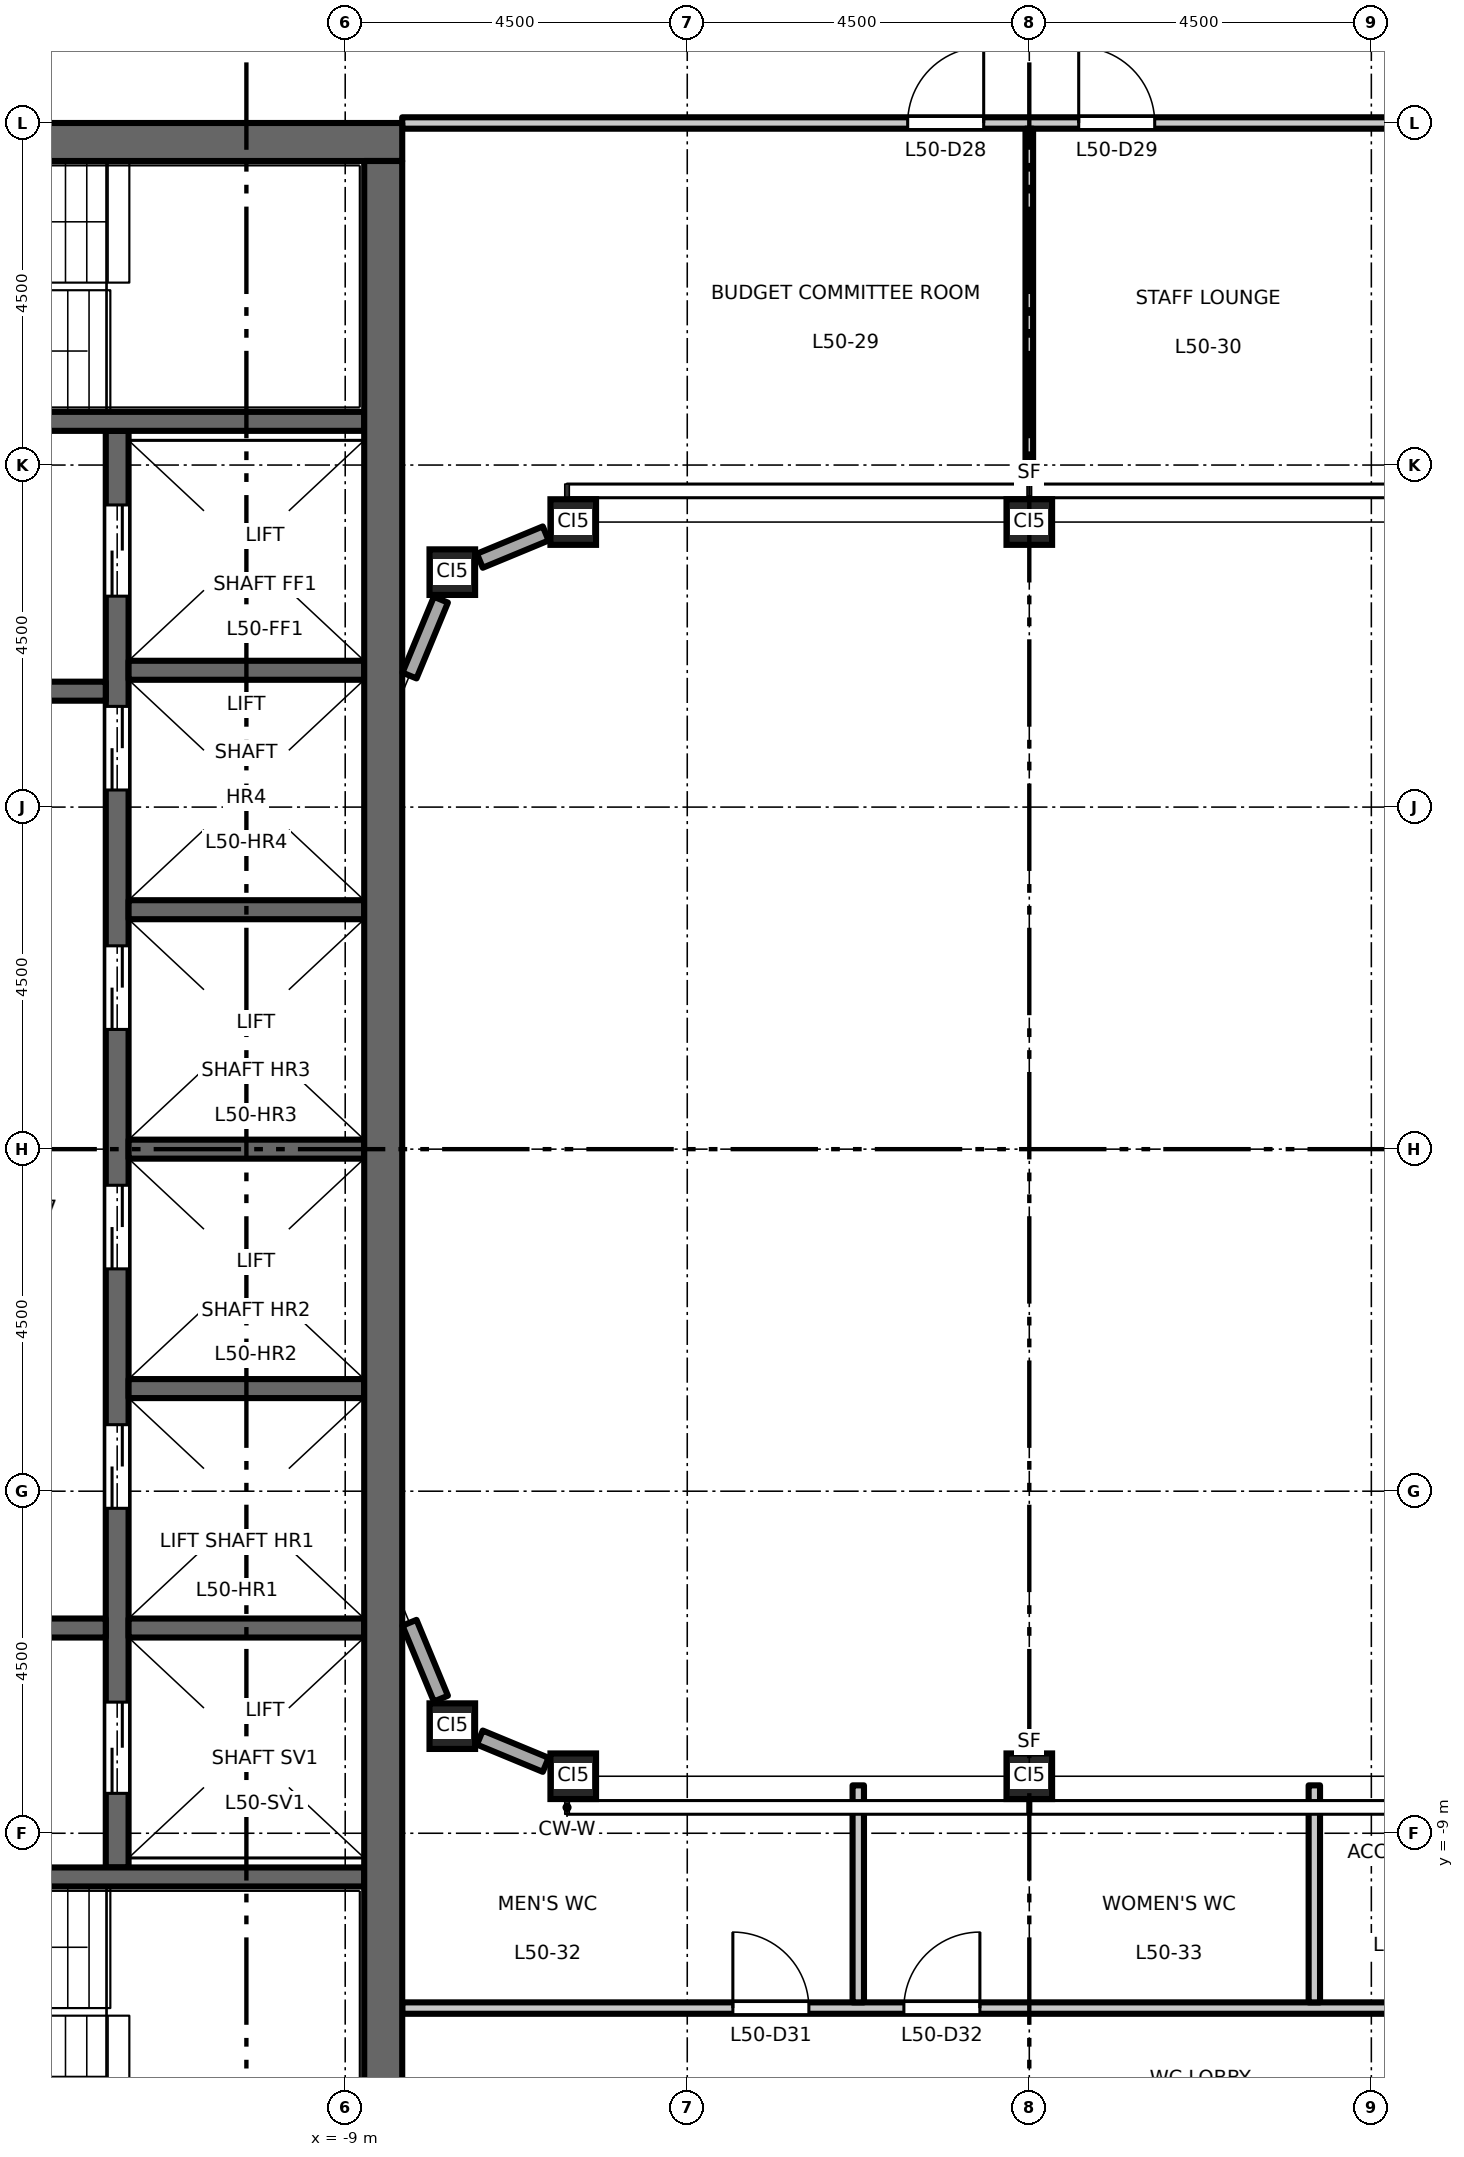
"""IFC4 building model, lengths in metres.
Left out: names, types, materials, properties, quantities, classifications, styles, units other than length and angle.
Written with IfcOpenShell. Run it as: python <this file> out.ifc"""

import sys

from ifc_helpers import new_model, si_unit, direction, frame, frame_2d, origin, origin_2d, place, context, subcontext, project, spatial, rectangle, hollow_rectangle, extrude, element, fill, save


model = new_model("IFC4")
c1 = context("Model", 3, precision=1e-05, world=origin(), true_north=direction((0.0, 1.0)))
c2 = subcontext(c1, "Body", "Model", "MODEL_VIEW")
j1 = project(units=[si_unit("LENGTHUNIT", "METRE"), si_unit("PLANEANGLEUNIT", "RADIAN")], contexts=[c1])
p1 = place(None, origin())
s1 = spatial("IfcSite", under=j1, at=p1, CompositionType="ELEMENT")
p2 = place(p1, origin())
s2 = spatial("IfcBuilding", under=s1, at=p2, CompositionType="ELEMENT")
p3 = place(p2, frame((0.0, 0.0, 233.2)))
s3 = spatial("IfcBuildingStorey", under=s2, at=p3, CompositionType="ELEMENT", Elevation=233.2)
for number, where, z_axis, x_axis in (
    (1, (-7.591, -7.591, 0.0), (0.0, 0.0, 1.0), (1.0, 0.0, 0.0)),
    (2, (-6.0, -8.25, 0.0), (0.0, 0.0, 1.0), (1.0, 0.0, 0.0)),
    (3, (0.0, -8.25, 0.0), (0.0, 0.0, 1.0), (1.0, 0.0, 0.0)),
    (4, (-7.591, 7.591, 0.0), (0.0, 0.0, 1.0), (1.0, 0.0, 0.0)),
    (5, (-6.0, 8.25, 0.0), (0.0, 0.0, 1.0), (1.0, 0.0, 0.0)),
    (6, (0.0, 8.25, 0.0), (0.0, 0.0, 1.0), (1.0, 0.0, 0.0)),
):
    element("IfcColumn", number, at=place(p3, frame(where, z_axis=z_axis, x_axis=x_axis)), inside=s3, PredefinedType="COLUMN", context=c2, shape_type="SweptSolid", body=[
        extrude(hollow_rectangle(XDim=0.6, YDim=0.6, WallThickness=0.032, at=origin_2d()), origin(), (0.0, 0.0, 1.0), 4.5),
    ])
p4 = place(p3, frame((-12.0, -9.45, 0.0), z_axis=(0.0, 0.0, 1.0), x_axis=(0.0, 1.0, 0.0)))
e7 = element("IfcWall", 7, at=p4, inside=s3, PredefinedType="SHEAR", context=c2, shape_type="SweptSolid", body=[
    extrude(rectangle(XDim=18.9, YDim=0.3, at=frame_2d((9.45, 0.0))), origin(), (0.0, 0.0, 1.0), 4.35),
])
p5 = place(p4, frame((4.725, 0.0, 0.0)))
e8 = element("IfcOpeningElement", 8, at=p5, cuts=e7, PredefinedType="OPENING", context=c2, shape_type="SweptSolid", body=[
    extrude(rectangle(XDim=1.1, YDim=2.1, at=frame_2d((0.55, 1.05))), frame((0.0, 0.16, 0.0), z_axis=(0.0, -1.0, 0.0), x_axis=(1.0, 0.0, 0.0)), (0.0, 0.0, 1.0), 0.32),
])
p6 = place(p4, frame((7.875, 0.0, 0.0)))
e9 = element("IfcOpeningElement", 9, at=p6, cuts=e7, PredefinedType="OPENING", context=c2, shape_type="SweptSolid", body=[
    extrude(rectangle(XDim=1.1, YDim=2.1, at=frame_2d((0.55, 1.05))), frame((0.0, 0.16, 0.0), z_axis=(0.0, -1.0, 0.0), x_axis=(1.0, 0.0, 0.0)), (0.0, 0.0, 1.0), 0.32),
])
p7 = place(p4, frame((11.025, 0.0, 0.0)))
e10 = element("IfcOpeningElement", 10, at=p7, cuts=e7, PredefinedType="OPENING", context=c2, shape_type="SweptSolid", body=[
    extrude(rectangle(XDim=1.1, YDim=2.1, at=frame_2d((0.55, 1.05))), frame((0.0, 0.16, 0.0), z_axis=(0.0, -1.0, 0.0), x_axis=(1.0, 0.0, 0.0)), (0.0, 0.0, 1.0), 0.32),
])
p8 = place(p4, frame((14.175, 0.0, 0.0)))
e11 = element("IfcOpeningElement", 11, at=p8, cuts=e7, PredefinedType="OPENING", context=c2, shape_type="SweptSolid", body=[
    extrude(rectangle(XDim=1.1, YDim=2.1, at=frame_2d((0.55, 1.05))), frame((0.0, 0.16, 0.0), z_axis=(0.0, -1.0, 0.0), x_axis=(1.0, 0.0, 0.0)), (0.0, 0.0, 1.0), 0.32),
])
p9 = place(p4, frame((16.725, 0.0, 0.0)))
e12 = element("IfcOpeningElement", 12, at=p9, cuts=e7, PredefinedType="OPENING", context=c2, shape_type="SweptSolid", body=[
    extrude(rectangle(XDim=1.2, YDim=2.1, at=frame_2d((0.6, 1.05))), frame((0.0, 0.16, 0.0), z_axis=(0.0, -1.0, 0.0), x_axis=(1.0, 0.0, 0.0)), (0.0, 0.0, 1.0), 0.32),
])
p10 = place(p4, frame((0.975, 0.0, 0.0)))
e13 = element("IfcOpeningElement", 13, at=p10, cuts=e7, PredefinedType="OPENING", context=c2, shape_type="SweptSolid", body=[
    extrude(rectangle(XDim=1.2, YDim=2.1, at=frame_2d((0.6, 1.05))), frame((0.0, 0.16, 0.0), z_axis=(0.0, -1.0, 0.0), x_axis=(1.0, 0.0, 0.0)), (0.0, 0.0, 1.0), 0.32),
])
p11 = place(p3, frame((-12.15, 6.025, 0.0), z_axis=(0.0, 0.0, 1.0), x_axis=(-1.0, 0.0, 0.0)))
e14 = element("IfcWall", 14, at=p11, inside=s3, PredefinedType="SHEAR", context=c2, shape_type="SweptSolid", body=[
    extrude(rectangle(XDim=4.6, YDim=0.25, at=frame_2d((2.3, 0.0))), origin(), (0.0, 0.0, 1.0), 4.35),
])
p12 = place(p11, frame((1.8, 0.0, 0.0)))
e15 = element("IfcOpeningElement", 15, at=p12, cuts=e14, PredefinedType="OPENING", context=c2, shape_type="SweptSolid", body=[
    extrude(rectangle(XDim=1.0, YDim=2.1, at=frame_2d((0.5, 1.05))), frame((0.0, 0.135, 0.0), z_axis=(0.0, -1.0, 0.0), x_axis=(1.0, 0.0, 0.0)), (0.0, 0.0, 1.0), 0.27),
])
p13 = place(p3, frame((-12.15, -6.3, 0.0), z_axis=(0.0, 0.0, 1.0), x_axis=(-1.0, 0.0, 0.0)))
e16 = element("IfcWall", 16, at=p13, inside=s3, PredefinedType="SHEAR", context=c2, shape_type="SweptSolid", body=[
    extrude(rectangle(XDim=9.1, YDim=0.25, at=frame_2d((4.55, 0.0))), origin(), (0.0, 0.0, 1.0), 4.35),
])
p14 = place(p13, frame((1.8, 0.0, 0.0)))
e17 = element("IfcOpeningElement", 17, at=p14, cuts=e16, PredefinedType="OPENING", context=c2, shape_type="SweptSolid", body=[
    extrude(rectangle(XDim=1.0, YDim=2.1, at=frame_2d((0.5, 1.05))), frame((0.0, 0.135, 0.0), z_axis=(0.0, -1.0, 0.0), x_axis=(1.0, 0.0, 0.0)), (0.0, 0.0, 1.0), 0.27),
])
for number, where, z_axis, x_axis in (
    (18, (-8.75, 0.0, 0.0), (0.0, 0.0, 1.0), (-1.0, 0.0, 0.0)),
    (19, (-8.75, 3.15, 0.0), (0.0, 0.0, 1.0), (-1.0, 0.0, 0.0)),
    (20, (-8.75, 6.3, 0.0), (0.0, 0.0, 1.0), (-1.0, 0.0, 0.0)),
    (21, (-8.75, -3.15, 0.0), (0.0, 0.0, 1.0), (-1.0, 0.0, 0.0)),
    (22, (-8.75, -6.3, 0.0), (0.0, 0.0, 1.0), (-1.0, 0.0, 0.0)),
):
    element("IfcWall", number, at=place(p3, frame(where, z_axis=z_axis, x_axis=x_axis)), inside=s3, PredefinedType="SHEAR", context=c2, shape_type="SweptSolid", body=[
        extrude(rectangle(XDim=3.1, YDim=0.25, at=frame_2d((1.55, 0.0))), origin(), (0.0, 0.0, 1.0), 4.35),
    ])
p15 = place(p3, frame((-8.75, 9.575, 0.0), z_axis=(0.0, 0.0, 1.0), x_axis=(-1.0, 0.0, 0.0)))
e23 = element("IfcWall", 23, at=p15, inside=s3, PredefinedType="SHEAR", context=c2, shape_type="SweptSolid", body=[
    extrude(rectangle(XDim=8.0, YDim=0.25, at=frame_2d((4.0, 0.0))), origin(), (0.0, 0.0, 1.0), 4.35),
])
p16 = place(p15, frame((6.65, 0.0, 0.0)))
e24 = element("IfcOpeningElement", 24, at=p16, cuts=e23, PredefinedType="OPENING", context=c2, shape_type="SweptSolid", body=[
    extrude(rectangle(XDim=1.1, YDim=2.1, at=frame_2d((0.55, 1.05))), frame((0.0, 0.135, 0.0), z_axis=(0.0, -1.0, 0.0), x_axis=(1.0, 0.0, 0.0)), (0.0, 0.0, 1.0), 0.27),
])
p17 = place(p3, frame((-8.75, -9.575, 0.0), z_axis=(0.0, 0.0, 1.0), x_axis=(-1.0, 0.0, 0.0)))
e25 = element("IfcWall", 25, at=p17, inside=s3, PredefinedType="SHEAR", context=c2, shape_type="SweptSolid", body=[
    extrude(rectangle(XDim=8.0, YDim=0.25, at=frame_2d((4.0, 0.0))), origin(), (0.0, 0.0, 1.0), 4.35),
])
p18 = place(p17, frame((6.65, 0.0, 0.0)))
e26 = element("IfcOpeningElement", 26, at=p18, cuts=e25, PredefinedType="OPENING", context=c2, shape_type="SweptSolid", body=[
    extrude(rectangle(XDim=1.1, YDim=2.1, at=frame_2d((0.55, 1.05))), frame((0.0, 0.135, 0.0), z_axis=(0.0, -1.0, 0.0), x_axis=(1.0, 0.0, 0.0)), (0.0, 0.0, 1.0), 0.27),
])
p19 = place(p3, frame((-8.25, 13.25, 0.0), z_axis=(0.0, 0.0, 1.0), x_axis=(-1.0, 0.0, 0.0)))
e27 = element("IfcWall", 27, at=p19, inside=s3, PredefinedType="SHEAR", context=c2, shape_type="SweptSolid", body=[
    extrude(rectangle(XDim=13.5, YDim=0.5, at=frame_2d((6.75, 0.0))), origin(), (0.0, 0.0, 1.0), 4.35),
])
p20 = place(p3, frame((-8.5, -13.0, 0.0), z_axis=(0.0, 0.0, 1.0), x_axis=(0.0, 1.0, 0.0)))
e28 = element("IfcWall", 28, at=p20, inside=s3, PredefinedType="SHEAR", context=c2, shape_type="SweptSolid", body=[
    extrude(rectangle(XDim=26.0, YDim=0.5, at=frame_2d((13.0, 0.0))), origin(), (0.0, 0.0, 1.0), 4.35),
])
p21 = place(p3, frame((-6.362, 8.1, 0.0), z_axis=(0.0, 0.0, 1.0), x_axis=(-0.923829670615, -0.382803787458, 0.0)))
e29 = element("IfcWall", 29, at=p21, inside=s3, PredefinedType="STANDARD", context=c2, shape_type="SweptSolid", body=[
    extrude(rectangle(XDim=0.938, YDim=0.2, at=frame_2d((0.469, 0.0))), origin(), (0.0, 0.0, 1.0), 3.918),
])
for number, where, z_axis, x_axis in (
    (30, (-7.741, 7.229, 0.0), (0.0, 0.0, 1.0), (-0.383, -0.924, 0.0)),
    (31, (-8.154, -6.231, 0.0), (0.0, 0.0, 1.0), (0.383, -0.924, 0.0)),
):
    element("IfcWall", number, at=place(p3, frame(where, z_axis=z_axis, x_axis=x_axis)), inside=s3, PredefinedType="STANDARD", context=c2, shape_type="SweptSolid", body=[
        extrude(rectangle(XDim=1.08, YDim=0.2, at=frame_2d((0.54, 0.0))), origin(), (0.0, 0.0, 1.0), 3.918),
    ])
p22 = place(p3, frame((-7.229, -7.741, 0.0), z_axis=(0.0, 0.0, 1.0), x_axis=(0.923829670615, -0.382803787458, 0.0)))
e32 = element("IfcWall", 32, at=p22, inside=s3, PredefinedType="STANDARD", context=c2, shape_type="SweptSolid", body=[
    extrude(rectangle(XDim=0.938, YDim=0.2, at=frame_2d((0.469, 0.0))), origin(), (0.0, 0.0, 1.0), 3.918),
])
p23 = place(p3, frame((-8.25, -11.3, 0.0), z_axis=(0.0, 0.0, 1.0), x_axis=(1.0, 0.0, 0.0)))
e33 = element("IfcWall", 33, at=p23, inside=s3, PredefinedType="PARTITIONING", context=c2, shape_type="SweptSolid", body=[
    extrude(rectangle(XDim=15.03, YDim=0.15, at=frame_2d((7.515, 0.0))), origin(), (0.0, 0.0, 1.0), 4.35),
])
p24 = place(p23, frame((4.35, 0.0, 0.0)))
e34 = element("IfcOpeningElement", 34, at=p24, cuts=e33, PredefinedType="OPENING", context=c2, shape_type="SweptSolid", body=[
    extrude(rectangle(XDim=1.0, YDim=2.1, at=frame_2d((0.5, 1.05))), frame((0.0, 0.085, 0.0), z_axis=(0.0, -1.0, 0.0), x_axis=(1.0, 0.0, 0.0)), (0.0, 0.0, 1.0), 0.17),
])
p25 = place(p23, frame((6.6, 0.0, 0.0)))
e35 = element("IfcOpeningElement", 35, at=p25, cuts=e33, PredefinedType="OPENING", context=c2, shape_type="SweptSolid", body=[
    extrude(rectangle(XDim=1.0, YDim=2.1, at=frame_2d((0.5, 1.05))), frame((0.0, 0.085, 0.0), z_axis=(0.0, -1.0, 0.0), x_axis=(1.0, 0.0, 0.0)), (0.0, 0.0, 1.0), 0.17),
])
p26 = place(p23, frame((13.38, 0.0, 0.0)))
e36 = element("IfcOpeningElement", 36, at=p26, cuts=e33, PredefinedType="OPENING", context=c2, shape_type="SweptSolid", body=[
    extrude(rectangle(XDim=1.0, YDim=2.1, at=frame_2d((0.5, 1.05))), frame((0.0, 0.085, 0.0), z_axis=(0.0, -1.0, 0.0), x_axis=(1.0, 0.0, 0.0)), (0.0, 0.0, 1.0), 0.17),
])
p27 = place(p3, frame((-8.25, 13.5, 0.0), z_axis=(0.0, 0.0, 1.0), x_axis=(1.0, 0.0, 0.0)))
e37 = element("IfcWall", 37, at=p27, inside=s3, PredefinedType="PARTITIONING", context=c2, shape_type="SweptSolid", body=[
    extrude(rectangle(XDim=16.5, YDim=0.15, at=frame_2d((8.25, 0.0))), origin(), (0.0, 0.0, 1.0), 4.35),
])
p28 = place(p27, frame((6.65, 0.0, 0.0)))
e38 = element("IfcOpeningElement", 38, at=p28, cuts=e37, PredefinedType="OPENING", context=c2, shape_type="SweptSolid", body=[
    extrude(rectangle(XDim=1.0, YDim=2.1, at=frame_2d((0.5, 1.05))), frame((0.0, 0.085, 0.0), z_axis=(0.0, -1.0, 0.0), x_axis=(1.0, 0.0, 0.0)), (0.0, 0.0, 1.0), 0.17),
])
p29 = place(p27, frame((8.9, 0.0, 0.0)))
e39 = element("IfcOpeningElement", 39, at=p29, cuts=e37, PredefinedType="OPENING", context=c2, shape_type="SweptSolid", body=[
    extrude(rectangle(XDim=1.0, YDim=2.1, at=frame_2d((0.5, 1.05))), frame((0.0, 0.085, 0.0), z_axis=(0.0, -1.0, 0.0), x_axis=(1.0, 0.0, 0.0)), (0.0, 0.0, 1.0), 0.17),
])
p30 = place(p3, frame((-2.25, -11.225, 0.0), z_axis=(0.0, 0.0, 1.0), x_axis=(0.0, 1.0, 0.0)))
e40 = element("IfcWall", 40, at=p30, inside=s3, PredefinedType="PARTITIONING", context=c2, shape_type="SweptSolid", body=[
    extrude(rectangle(XDim=2.855, YDim=0.15, at=frame_2d((1.427, 0.0))), origin(), (0.0, 0.0, 1.0), 4.35),
])
p31 = place(p3, frame((0.0, 8.6, 0.0), z_axis=(0.0, 0.0, 1.0), x_axis=(0.0, 1.0, 0.0)))
e41 = element("IfcWall", 41, at=p31, inside=s3, PredefinedType="PARTITIONING", context=c2, shape_type="SweptSolid", body=[
    extrude(rectangle(XDim=4.825, YDim=0.1, at=frame_2d((2.413, 0.0))), origin(), (0.0, 0.0, 1.0), 3.55),
])
p32 = place(p3, frame((3.75, -11.225, 0.0), z_axis=(0.0, 0.0, 1.0), x_axis=(0.0, 1.0, 0.0)))
e42 = element("IfcWall", 42, at=p32, inside=s3, PredefinedType="PARTITIONING", context=c2, shape_type="SweptSolid", body=[
    extrude(rectangle(XDim=2.855, YDim=0.15, at=frame_2d((1.427, 0.0))), origin(), (0.0, 0.0, 1.0), 4.35),
])
p33 = place(p5, origin())
e43 = element("IfcDoor", 43, at=p33, inside=s3, OperationType="DOUBLE_DOOR_SLIDING", PredefinedType="DOOR", context=c2, shape_type="SweptSolid", body=[
    extrude(rectangle(XDim=1.1, YDim=2.1, at=frame_2d((0.55, 1.05))), frame((0.0, 0.025, 0.0), z_axis=(0.0, -1.0, 0.0), x_axis=(1.0, 0.0, 0.0)), (0.0, 0.0, 1.0), 0.05),
])
fill(e8, e43)
p34 = place(p6, origin())
e44 = element("IfcDoor", 44, at=p34, inside=s3, OperationType="DOUBLE_DOOR_SLIDING", PredefinedType="DOOR", context=c2, shape_type="SweptSolid", body=[
    extrude(rectangle(XDim=1.1, YDim=2.1, at=frame_2d((0.55, 1.05))), frame((0.0, 0.025, 0.0), z_axis=(0.0, -1.0, 0.0), x_axis=(1.0, 0.0, 0.0)), (0.0, 0.0, 1.0), 0.05),
])
fill(e9, e44)
p35 = place(p7, origin())
e45 = element("IfcDoor", 45, at=p35, inside=s3, OperationType="DOUBLE_DOOR_SLIDING", PredefinedType="DOOR", context=c2, shape_type="SweptSolid", body=[
    extrude(rectangle(XDim=1.1, YDim=2.1, at=frame_2d((0.55, 1.05))), frame((0.0, 0.025, 0.0), z_axis=(0.0, -1.0, 0.0), x_axis=(1.0, 0.0, 0.0)), (0.0, 0.0, 1.0), 0.05),
])
fill(e10, e45)
p36 = place(p8, origin())
e46 = element("IfcDoor", 46, at=p36, inside=s3, OperationType="DOUBLE_DOOR_SLIDING", PredefinedType="DOOR", context=c2, shape_type="SweptSolid", body=[
    extrude(rectangle(XDim=1.1, YDim=2.1, at=frame_2d((0.55, 1.05))), frame((0.0, 0.025, 0.0), z_axis=(0.0, -1.0, 0.0), x_axis=(1.0, 0.0, 0.0)), (0.0, 0.0, 1.0), 0.05),
])
fill(e11, e46)
p37 = place(p9, origin())
e47 = element("IfcDoor", 47, at=p37, inside=s3, OperationType="DOUBLE_DOOR_SLIDING", PredefinedType="DOOR", context=c2, shape_type="SweptSolid", body=[
    extrude(rectangle(XDim=1.2, YDim=2.1, at=frame_2d((0.6, 1.05))), frame((0.0, 0.025, 0.0), z_axis=(0.0, -1.0, 0.0), x_axis=(1.0, 0.0, 0.0)), (0.0, 0.0, 1.0), 0.05),
])
fill(e12, e47)
p38 = place(p10, origin())
e48 = element("IfcDoor", 48, at=p38, inside=s3, OperationType="DOUBLE_DOOR_SLIDING", PredefinedType="DOOR", context=c2, shape_type="SweptSolid", body=[
    extrude(rectangle(XDim=1.2, YDim=2.1, at=frame_2d((0.6, 1.05))), frame((0.0, 0.025, 0.0), z_axis=(0.0, -1.0, 0.0), x_axis=(1.0, 0.0, 0.0)), (0.0, 0.0, 1.0), 0.05),
])
fill(e13, e48)
p39 = place(p28, origin())
e49 = element("IfcDoor", 49, at=p39, inside=s3, OperationType="SINGLE_SWING_RIGHT", PredefinedType="DOOR", context=c2, shape_type="SweptSolid", body=[
    extrude(rectangle(XDim=1.0, YDim=2.1, at=frame_2d((0.5, 1.05))), frame((0.0, 0.025, 0.0), z_axis=(0.0, -1.0, 0.0), x_axis=(1.0, 0.0, 0.0)), (0.0, 0.0, 1.0), 0.05),
])
fill(e38, e49)
p40 = place(p29, origin())
e50 = element("IfcDoor", 50, at=p40, inside=s3, OperationType="SINGLE_SWING_LEFT", PredefinedType="DOOR", context=c2, shape_type="SweptSolid", body=[
    extrude(rectangle(XDim=1.0, YDim=2.1, at=frame_2d((0.5, 1.05))), frame((0.0, 0.025, 0.0), z_axis=(0.0, -1.0, 0.0), x_axis=(1.0, 0.0, 0.0)), (0.0, 0.0, 1.0), 0.05),
])
fill(e39, e50)
p41 = place(p24, origin())
e51 = element("IfcDoor", 51, at=p41, inside=s3, OperationType="SINGLE_SWING_LEFT", PredefinedType="DOOR", context=c2, shape_type="SweptSolid", body=[
    extrude(rectangle(XDim=1.0, YDim=2.1, at=frame_2d((0.5, 1.05))), frame((0.0, 0.025, 0.0), z_axis=(0.0, -1.0, 0.0), x_axis=(1.0, 0.0, 0.0)), (0.0, 0.0, 1.0), 0.05),
])
fill(e34, e51)
p42 = place(p25, origin())
e52 = element("IfcDoor", 52, at=p42, inside=s3, OperationType="SINGLE_SWING_RIGHT", PredefinedType="DOOR", context=c2, shape_type="SweptSolid", body=[
    extrude(rectangle(XDim=1.0, YDim=2.1, at=frame_2d((0.5, 1.05))), frame((0.0, 0.025, 0.0), z_axis=(0.0, -1.0, 0.0), x_axis=(1.0, 0.0, 0.0)), (0.0, 0.0, 1.0), 0.05),
])
fill(e35, e52)
save(model, sys.argv[1])
